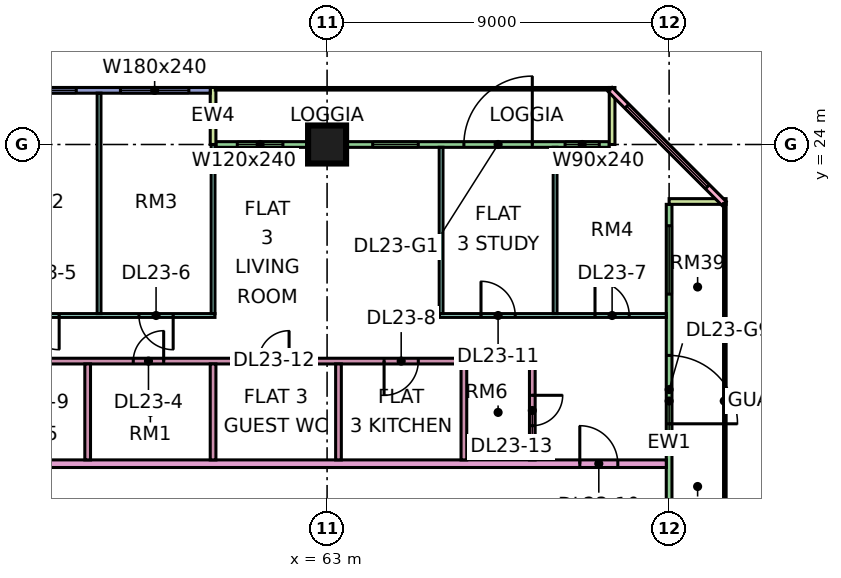
"""IFC4 building model, lengths in metres.
Left out: names, types, materials, properties, quantities, classifications, styles, units other than length and angle.
Written with IfcOpenShell. Run it as: python <this file> out.ifc"""

import sys

from ifc_helpers import new_model, si_unit, direction, frame, frame_2d, origin, origin_2d, place, context, subcontext, project, spatial, rectangle, extrude, element, fill, save


model = new_model("IFC4")
c1 = context("Model", 3, precision=1e-05, world=origin(), true_north=direction((0.0, 1.0)))
c2 = subcontext(c1, "Body", "Model", "MODEL_VIEW")
j1 = project(units=[si_unit("LENGTHUNIT", "METRE"), si_unit("PLANEANGLEUNIT", "RADIAN")], contexts=[c1])
p1 = place(None, origin())
s1 = spatial("IfcSite", under=j1, at=p1, CompositionType="ELEMENT")
p2 = place(p1, origin())
s2 = spatial("IfcBuilding", under=s1, at=p2, CompositionType="ELEMENT")
p3 = place(p2, frame((0.0, 0.0, 103.15)))
s3 = spatial("IfcBuildingStorey", under=s2, at=p3, CompositionType="ELEMENT", Elevation=103.15)
p4 = place(p3, frame((63.0, 24.0, 0.0), z_axis=(0.0, 0.0, 1.0), x_axis=(1.0, 0.0, 0.0)))
e1 = element("IfcColumn", 1, at=p4, inside=s3, PredefinedType="COLUMN", context=c2, shape_type="SweptSolid", body=[
    extrude(rectangle(XDim=1.0, YDim=1.0, at=origin_2d()), origin(), (0.0, 0.0, 1.0), 3.75),
])
p5 = place(p3, frame((70.425, 24.0, 0.0), z_axis=(0.0, 0.0, 1.0), x_axis=(-1.0, 0.0, 0.0)))
e2 = element("IfcWall", 2, at=p5, inside=s3, PredefinedType="SOLIDWALL", context=c2, shape_type="SweptSolid", body=[
    extrude(rectangle(XDim=10.35, YDim=0.15, at=frame_2d((5.175, 0.0))), origin(), (0.0, 0.0, 1.0), 3.35),
])
p6 = place(p5, frame((0.262, 0.0, 0.45)))
e3 = element("IfcOpeningElement", 3, at=p6, cuts=e2, PredefinedType="OPENING", context=c2, shape_type="SweptSolid", body=[
    extrude(rectangle(XDim=0.9, YDim=2.4, at=frame_2d((0.45, 1.2))), frame((0.0, 0.085, 0.0), z_axis=(0.0, -1.0, 0.0), x_axis=(1.0, 0.0, 0.0)), (0.0, 0.0, 1.0), 0.17),
])
p7 = place(p5, frame((2.025, 0.0, 0.0)))
e4 = element("IfcOpeningElement", 4, at=p7, cuts=e2, PredefinedType="OPENING", context=c2, shape_type="SweptSolid", body=[
    extrude(rectangle(XDim=1.8, YDim=2.4, at=frame_2d((0.9, 1.2))), frame((0.0, 0.085, 0.0), z_axis=(0.0, -1.0, 0.0), x_axis=(1.0, 0.0, 0.0)), (0.0, 0.0, 1.0), 0.17),
])
p8 = place(p5, frame((5.025, 0.0, 0.45)))
e5 = element("IfcOpeningElement", 5, at=p8, cuts=e2, PredefinedType="OPENING", context=c2, shape_type="SweptSolid", body=[
    extrude(rectangle(XDim=1.2, YDim=2.4, at=frame_2d((0.6, 1.2))), frame((0.0, 0.085, 0.0), z_axis=(0.0, -1.0, 0.0), x_axis=(1.0, 0.0, 0.0)), (0.0, 0.0, 1.0), 0.17),
])
p9 = place(p5, frame((8.587, 0.0, 0.45)))
e6 = element("IfcOpeningElement", 6, at=p9, cuts=e2, PredefinedType="OPENING", context=c2, shape_type="SweptSolid", body=[
    extrude(rectangle(XDim=1.2, YDim=2.4, at=frame_2d((0.6, 1.2))), frame((0.0, 0.085, 0.0), z_axis=(0.0, -1.0, 0.0), x_axis=(1.0, 0.0, 0.0)), (0.0, 0.0, 1.0), 0.17),
])
for number, where, z_axis, x_axis in (
    (7, (70.5, 25.5, 0.0), (0.0, 0.0, 1.0), (0.0, -1.0, 0.0)),
    (8, (60.0, 25.5, 0.0), (0.0, 0.0, 1.0), (0.0, -1.0, 0.0)),
):
    element("IfcWall", number, at=place(p3, frame(where, z_axis=z_axis, x_axis=x_axis)), inside=s3, PredefinedType="SOLIDWALL", context=c2, shape_type="SweptSolid", body=[
        extrude(rectangle(XDim=1.5, YDim=0.15, at=frame_2d((0.75, 0.0))), origin(), (0.0, 0.0, 1.0), 3.35),
    ])
p10 = place(p3, frame((59.925, 25.425, 0.0), z_axis=(0.0, 0.0, 1.0), x_axis=(-1.0, 0.0, 0.0)))
e9 = element("IfcWall", 9, at=p10, inside=s3, PredefinedType="SOLIDWALL", context=c2, shape_type="SweptSolid", body=[
    extrude(rectangle(XDim=11.85, YDim=0.15, at=frame_2d((5.925, 0.0))), origin(), (0.0, 0.0, 1.0), 3.35),
])
p11 = place(p10, frame((0.562, 0.0, 0.45)))
e10 = element("IfcOpeningElement", 10, at=p11, cuts=e9, PredefinedType="OPENING", context=c2, shape_type="SweptSolid", body=[
    extrude(rectangle(XDim=1.8, YDim=2.4, at=frame_2d((0.9, 1.2))), frame((0.0, 0.085, 0.0), z_axis=(0.0, -1.0, 0.0), x_axis=(1.0, 0.0, 0.0)), (0.0, 0.0, 1.0), 0.17),
])
p12 = place(p10, frame((3.525, 0.0, 0.45)))
e11 = element("IfcOpeningElement", 11, at=p12, cuts=e9, PredefinedType="OPENING", context=c2, shape_type="SweptSolid", body=[
    extrude(rectangle(XDim=1.8, YDim=2.4, at=frame_2d((0.9, 1.2))), frame((0.0, 0.085, 0.0), z_axis=(0.0, -1.0, 0.0), x_axis=(1.0, 0.0, 0.0)), (0.0, 0.0, 1.0), 0.17),
])
p13 = place(p10, frame((6.488, 0.0, 0.45)))
e12 = element("IfcOpeningElement", 12, at=p13, cuts=e9, PredefinedType="OPENING", context=c2, shape_type="SweptSolid", body=[
    extrude(rectangle(XDim=4.8, YDim=2.4, at=frame_2d((2.4, 1.2))), frame((0.0, 0.085, 0.0), z_axis=(0.0, -1.0, 0.0), x_axis=(1.0, 0.0, 0.0)), (0.0, 0.0, 1.0), 0.17),
])
p14 = place(p3, frame((72.0, 12.075, 0.0), z_axis=(0.0, 0.0, 1.0), x_axis=(0.0, 1.0, 0.0)))
e13 = element("IfcWall", 13, at=p14, inside=s3, PredefinedType="SOLIDWALL", context=c2, shape_type="SweptSolid", body=[
    extrude(rectangle(XDim=10.35, YDim=0.15, at=frame_2d((5.175, 0.0))), origin(), (0.0, 0.0, 1.0), 3.35),
])
p15 = place(p14, frame((4.575, 0.0, 0.0)))
e14 = element("IfcOpeningElement", 14, at=p15, cuts=e13, PredefinedType="OPENING", context=c2, shape_type="SweptSolid", body=[
    extrude(rectangle(XDim=1.8, YDim=2.4, at=frame_2d((0.9, 1.2))), frame((0.0, 0.085, 0.0), z_axis=(0.0, -1.0, 0.0), x_axis=(1.0, 0.0, 0.0)), (0.0, 0.0, 1.0), 0.17),
])
p16 = place(p14, frame((7.988, 0.0, 0.45)))
e15 = element("IfcOpeningElement", 15, at=p16, cuts=e13, PredefinedType="OPENING", context=c2, shape_type="SweptSolid", body=[
    extrude(rectangle(XDim=1.8, YDim=2.4, at=frame_2d((0.9, 1.2))), frame((0.0, 0.085, 0.0), z_axis=(0.0, -1.0, 0.0), x_axis=(1.0, 0.0, 0.0)), (0.0, 0.0, 1.0), 0.17),
])
p17 = place(p3, frame((73.5, 22.5, 0.0), z_axis=(0.0, 0.0, 1.0), x_axis=(-1.0, 0.0, 0.0)))
e16 = element("IfcWall", 16, at=p17, inside=s3, PredefinedType="SOLIDWALL", context=c2, shape_type="SweptSolid", body=[
    extrude(rectangle(XDim=1.5, YDim=0.15, at=frame_2d((0.75, 0.0))), origin(), (0.0, 0.0, 1.0), 3.35),
])
p18 = place(p3, frame((73.447, 22.447, 0.0), z_axis=(0.0, 0.0, 1.0), x_axis=(-0.707106781187, 0.707106781187, 0.0)))
e17 = element("IfcWall", 17, at=p18, inside=s3, PredefinedType="SOLIDWALL", context=c2, shape_type="SweptSolid", body=[
    extrude(rectangle(XDim=4.243, YDim=0.15, at=frame_2d((2.121, 0.0))), origin(), (0.0, 0.0, 1.0), 3.35),
])
p19 = place(p18, frame((0.621, 0.0, 0.45)))
e18 = element("IfcOpeningElement", 18, at=p19, cuts=e17, PredefinedType="OPENING", context=c2, shape_type="SweptSolid", body=[
    extrude(rectangle(XDim=3.0, YDim=2.4, at=frame_2d((1.5, 1.2))), frame((0.0, 0.085, 0.0), z_axis=(0.0, -1.0, 0.0), x_axis=(1.0, 0.0, 0.0)), (0.0, 0.0, 1.0), 0.17),
])
p20 = place(p3, frame((51.225, 15.6, 0.0), z_axis=(0.0, 0.0, 1.0), x_axis=(1.0, 0.0, 0.0)))
e19 = element("IfcWall", 19, at=p20, inside=s3, PredefinedType="PARTITIONING", context=c2, shape_type="SweptSolid", body=[
    extrude(rectangle(XDim=20.701, YDim=0.2, at=frame_2d((10.351, 0.0))), origin(), (0.0, 0.0, 1.0), 3.35),
])
p21 = place(p20, frame((18.425, 0.0, 0.0)))
e20 = element("IfcOpeningElement", 20, at=p21, cuts=e19, PredefinedType="OPENING", context=c2, shape_type="SweptSolid", body=[
    extrude(rectangle(XDim=1.0, YDim=2.1, at=frame_2d((0.5, 1.05))), frame((0.0, 0.11, 0.0), z_axis=(0.0, -1.0, 0.0), x_axis=(1.0, 0.0, 0.0)), (0.0, 0.0, 1.0), 0.22),
])
p22 = place(p20, frame((0.875, 0.0, 0.0)))
e21 = element("IfcOpeningElement", 21, at=p22, cuts=e19, PredefinedType="OPENING", context=c2, shape_type="SweptSolid", body=[
    extrude(rectangle(XDim=1.0, YDim=2.1, at=frame_2d((0.5, 1.05))), frame((0.0, 0.11, 0.0), z_axis=(0.0, -1.0, 0.0), x_axis=(1.0, 0.0, 0.0)), (0.0, 0.0, 1.0), 0.22),
])
p23 = place(p3, frame((54.1, 18.3, 0.0), z_axis=(0.0, 0.0, 1.0), x_axis=(1.0, 0.0, 0.0)))
e22 = element("IfcWall", 22, at=p23, inside=s3, PredefinedType="PARTITIONING", context=c2, shape_type="SweptSolid", body=[
    extrude(rectangle(XDim=14.375, YDim=0.15, at=frame_2d((7.188, 0.0))), origin(), (0.0, 0.0, 1.0), 3.35),
])
p24 = place(p23, frame((3.8, 0.0, 0.0)))
e23 = element("IfcOpeningElement", 23, at=p24, cuts=e22, PredefinedType="OPENING", context=c2, shape_type="SweptSolid", body=[
    extrude(rectangle(XDim=0.8, YDim=2.1, at=frame_2d((0.4, 1.05))), frame((0.0, 0.085, 0.0), z_axis=(0.0, -1.0, 0.0), x_axis=(1.0, 0.0, 0.0)), (0.0, 0.0, 1.0), 0.17),
])
p25 = place(p23, frame((10.4, 0.0, 0.0)))
e24 = element("IfcOpeningElement", 24, at=p25, cuts=e22, PredefinedType="OPENING", context=c2, shape_type="SweptSolid", body=[
    extrude(rectangle(XDim=0.9, YDim=2.1, at=frame_2d((0.45, 1.05))), frame((0.0, 0.085, 0.0), z_axis=(0.0, -1.0, 0.0), x_axis=(1.0, 0.0, 0.0)), (0.0, 0.0, 1.0), 0.17),
])
p26 = place(p23, frame((0.8, 0.0, 0.0)))
e25 = element("IfcOpeningElement", 25, at=p26, cuts=e22, PredefinedType="OPENING", context=c2, shape_type="SweptSolid", body=[
    extrude(rectangle(XDim=0.8, YDim=2.1, at=frame_2d((0.4, 1.05))), frame((0.0, 0.085, 0.0), z_axis=(0.0, -1.0, 0.0), x_axis=(1.0, 0.0, 0.0)), (0.0, 0.0, 1.0), 0.17),
])
p27 = place(p23, frame((7.1, 0.0, 0.0)))
e26 = element("IfcOpeningElement", 26, at=p27, cuts=e22, PredefinedType="OPENING", context=c2, shape_type="SweptSolid", body=[
    extrude(rectangle(XDim=0.8, YDim=2.1, at=frame_2d((0.4, 1.05))), frame((0.0, 0.085, 0.0), z_axis=(0.0, -1.0, 0.0), x_axis=(1.0, 0.0, 0.0)), (0.0, 0.0, 1.0), 0.17),
])
p28 = place(p3, frame((54.1, 19.5, 0.0), z_axis=(0.0, 0.0, 1.0), x_axis=(1.0, 0.0, 0.0)))
e27 = element("IfcWall", 27, at=p28, inside=s3, PredefinedType="PARTITIONING", context=c2, shape_type="SweptSolid", body=[
    extrude(rectangle(XDim=5.95, YDim=0.1, at=frame_2d((2.975, 0.0))), origin(), (0.0, 0.0, 1.0), 3.35),
])
p29 = place(p28, frame((0.95, 0.0, 0.0)))
e28 = element("IfcOpeningElement", 28, at=p29, cuts=e27, PredefinedType="OPENING", context=c2, shape_type="SweptSolid", body=[
    extrude(rectangle(XDim=0.9, YDim=2.1, at=frame_2d((0.45, 1.05))), frame((0.0, 0.06, 0.0), z_axis=(0.0, -1.0, 0.0), x_axis=(1.0, 0.0, 0.0)), (0.0, 0.0, 1.0), 0.12),
])
p30 = place(p28, frame((3.95, 0.0, 0.0)))
e29 = element("IfcOpeningElement", 29, at=p30, cuts=e27, PredefinedType="OPENING", context=c2, shape_type="SweptSolid", body=[
    extrude(rectangle(XDim=0.9, YDim=2.1, at=frame_2d((0.45, 1.05))), frame((0.0, 0.06, 0.0), z_axis=(0.0, -1.0, 0.0), x_axis=(1.0, 0.0, 0.0)), (0.0, 0.0, 1.0), 0.12),
])
p31 = place(p3, frame((56.7, 15.7, 0.0), z_axis=(0.0, 0.0, 1.0), x_axis=(0.0, 1.0, 0.0)))
e30 = element("IfcWall", 30, at=p31, inside=s3, PredefinedType="PARTITIONING", context=c2, shape_type="SweptSolid", body=[
    extrude(rectangle(XDim=2.525, YDim=0.15, at=frame_2d((1.263, 0.0))), origin(), (0.0, 0.0, 1.0), 3.35),
])
p32 = place(p3, frame((57.0, 19.55, 0.0), z_axis=(0.0, 0.0, 1.0), x_axis=(0.0, 1.0, 0.0)))
e31 = element("IfcWall", 31, at=p32, inside=s3, PredefinedType="PARTITIONING", context=c2, shape_type="SweptSolid", body=[
    extrude(rectangle(XDim=5.801, YDim=0.1, at=frame_2d((2.9, 0.0))), origin(), (0.0, 0.0, 1.0), 3.35),
])
p33 = place(p3, frame((60.0, 15.7, 0.0), z_axis=(0.0, 0.0, 1.0), x_axis=(0.0, 1.0, 0.0)))
e32 = element("IfcWall", 32, at=p33, inside=s3, PredefinedType="PARTITIONING", context=c2, shape_type="SweptSolid", body=[
    extrude(rectangle(XDim=2.525, YDim=0.15, at=frame_2d((1.263, 0.0))), origin(), (0.0, 0.0, 1.0), 3.35),
])
p34 = place(p3, frame((60.0, 19.55, 0.0), z_axis=(0.0, 0.0, 1.0), x_axis=(0.0, 1.0, 0.0)))
e33 = element("IfcWall", 33, at=p34, inside=s3, PredefinedType="PARTITIONING", context=c2, shape_type="SweptSolid", body=[
    extrude(rectangle(XDim=4.45, YDim=0.1, at=frame_2d((2.225, 0.0))), origin(), (0.0, 0.0, 1.0), 3.35),
])
p35 = place(p3, frame((63.3, 15.7, 0.0), z_axis=(0.0, 0.0, 1.0), x_axis=(0.0, 1.0, 0.0)))
e34 = element("IfcWall", 34, at=p35, inside=s3, PredefinedType="PARTITIONING", context=c2, shape_type="SweptSolid", body=[
    extrude(rectangle(XDim=2.525, YDim=0.15, at=frame_2d((1.263, 0.0))), origin(), (0.0, 0.0, 1.0), 3.35),
])
p36 = place(p3, frame((65.95, 19.5, 0.0), z_axis=(0.0, 0.0, 1.0), x_axis=(1.0, 0.0, 0.0)))
e35 = element("IfcWall", 35, at=p36, inside=s3, PredefinedType="PARTITIONING", context=c2, shape_type="SweptSolid", body=[
    extrude(rectangle(XDim=5.976, YDim=0.1, at=frame_2d((2.988, 0.0))), origin(), (0.0, 0.0, 1.0), 3.35),
])
p37 = place(p36, frame((4.1, 0.0, 0.0)))
e36 = element("IfcOpeningElement", 36, at=p37, cuts=e35, PredefinedType="OPENING", context=c2, shape_type="SweptSolid", body=[
    extrude(rectangle(XDim=0.9, YDim=2.1, at=frame_2d((0.45, 1.05))), frame((0.0, 0.06, 0.0), z_axis=(0.0, -1.0, 0.0), x_axis=(1.0, 0.0, 0.0)), (0.0, 0.0, 1.0), 0.12),
])
p38 = place(p36, frame((1.1, 0.0, 0.0)))
e37 = element("IfcOpeningElement", 37, at=p38, cuts=e35, PredefinedType="OPENING", context=c2, shape_type="SweptSolid", body=[
    extrude(rectangle(XDim=0.9, YDim=2.1, at=frame_2d((0.45, 1.05))), frame((0.0, 0.06, 0.0), z_axis=(0.0, -1.0, 0.0), x_axis=(1.0, 0.0, 0.0)), (0.0, 0.0, 1.0), 0.12),
])
p39 = place(p3, frame((66.0, 19.55, 0.0), z_axis=(0.0, 0.0, 1.0), x_axis=(0.0, 1.0, 0.0)))
e38 = element("IfcWall", 38, at=p39, inside=s3, PredefinedType="PARTITIONING", context=c2, shape_type="SweptSolid", body=[
    extrude(rectangle(XDim=4.376, YDim=0.1, at=frame_2d((2.188, 0.0))), origin(), (0.0, 0.0, 1.0), 3.35),
])
p40 = place(p3, frame((66.6, 15.7, 0.0), z_axis=(0.0, 0.0, 1.0), x_axis=(0.0, 1.0, 0.0)))
e39 = element("IfcWall", 39, at=p40, inside=s3, PredefinedType="PARTITIONING", context=c2, shape_type="SweptSolid", body=[
    extrude(rectangle(XDim=2.525, YDim=0.15, at=frame_2d((1.263, 0.0))), origin(), (0.0, 0.0, 1.0), 3.35),
])
p41 = place(p3, frame((68.4, 15.7, 0.0), z_axis=(0.0, 0.0, 1.0), x_axis=(0.0, 1.0, 0.0)))
e40 = element("IfcWall", 40, at=p41, inside=s3, PredefinedType="PARTITIONING", context=c2, shape_type="SweptSolid", body=[
    extrude(rectangle(XDim=2.525, YDim=0.15, at=frame_2d((1.263, 0.0))), origin(), (0.0, 0.0, 1.0), 3.35),
])
p42 = place(p41, frame((0.9, 0.0, 0.0)))
e41 = element("IfcOpeningElement", 41, at=p42, cuts=e40, PredefinedType="OPENING", context=c2, shape_type="SweptSolid", body=[
    extrude(rectangle(XDim=0.8, YDim=2.1, at=frame_2d((0.4, 1.05))), frame((0.0, 0.085, 0.0), z_axis=(0.0, -1.0, 0.0), x_axis=(1.0, 0.0, 0.0)), (0.0, 0.0, 1.0), 0.17),
])
p43 = place(p3, frame((69.0, 19.55, 0.0), z_axis=(0.0, 0.0, 1.0), x_axis=(0.0, 1.0, 0.0)))
e42 = element("IfcWall", 42, at=p43, inside=s3, PredefinedType="PARTITIONING", context=c2, shape_type="SweptSolid", body=[
    extrude(rectangle(XDim=4.376, YDim=0.1, at=frame_2d((2.188, 0.0))), origin(), (0.0, 0.0, 1.0), 3.35),
])
p44 = place(p6, origin())
e43 = element("IfcWindow", 43, at=p44, inside=s3, PartitioningType="SINGLE_PANEL", PredefinedType="WINDOW", context=c2, shape_type="SweptSolid", body=[
    extrude(rectangle(XDim=0.9, YDim=2.4, at=frame_2d((0.45, 1.2))), frame((0.0, 0.03, 0.0), z_axis=(0.0, -1.0, 0.0), x_axis=(1.0, 0.0, 0.0)), (0.0, 0.0, 1.0), 0.06),
])
fill(e3, e43)
p45 = place(p7, frame((1.8, 0.0, 0.0), z_axis=(0.0, 0.0, 1.0), x_axis=(-1.0, 0.0, 0.0)))
e44 = element("IfcDoor", 44, at=p45, inside=s3, OperationType="DOUBLE_DOOR_SINGLE_SWING", PredefinedType="DOOR", context=c2, shape_type="SweptSolid", body=[
    extrude(rectangle(XDim=1.8, YDim=2.4, at=frame_2d((0.9, 1.2))), frame((0.0, 0.025, 0.0), z_axis=(0.0, -1.0, 0.0), x_axis=(1.0, 0.0, 0.0)), (0.0, 0.0, 1.0), 0.05),
])
fill(e4, e44)
p46 = place(p8, origin())
e45 = element("IfcWindow", 45, at=p46, inside=s3, PartitioningType="SINGLE_PANEL", PredefinedType="WINDOW", context=c2, shape_type="SweptSolid", body=[
    extrude(rectangle(XDim=1.2, YDim=2.4, at=frame_2d((0.6, 1.2))), frame((0.0, 0.03, 0.0), z_axis=(0.0, -1.0, 0.0), x_axis=(1.0, 0.0, 0.0)), (0.0, 0.0, 1.0), 0.06),
])
fill(e5, e45)
p47 = place(p9, origin())
e46 = element("IfcWindow", 46, at=p47, inside=s3, PartitioningType="SINGLE_PANEL", PredefinedType="WINDOW", context=c2, shape_type="SweptSolid", body=[
    extrude(rectangle(XDim=1.2, YDim=2.4, at=frame_2d((0.6, 1.2))), frame((0.0, 0.03, 0.0), z_axis=(0.0, -1.0, 0.0), x_axis=(1.0, 0.0, 0.0)), (0.0, 0.0, 1.0), 0.06),
])
fill(e6, e46)
p48 = place(p11, origin())
e47 = element("IfcWindow", 47, at=p48, inside=s3, PartitioningType="SINGLE_PANEL", PredefinedType="WINDOW", context=c2, shape_type="SweptSolid", body=[
    extrude(rectangle(XDim=1.8, YDim=2.4, at=frame_2d((0.9, 1.2))), frame((0.0, 0.03, 0.0), z_axis=(0.0, -1.0, 0.0), x_axis=(1.0, 0.0, 0.0)), (0.0, 0.0, 1.0), 0.06),
])
fill(e10, e47)
p49 = place(p12, origin())
e48 = element("IfcWindow", 48, at=p49, inside=s3, PartitioningType="SINGLE_PANEL", PredefinedType="WINDOW", context=c2, shape_type="SweptSolid", body=[
    extrude(rectangle(XDim=1.8, YDim=2.4, at=frame_2d((0.9, 1.2))), frame((0.0, 0.03, 0.0), z_axis=(0.0, -1.0, 0.0), x_axis=(1.0, 0.0, 0.0)), (0.0, 0.0, 1.0), 0.06),
])
fill(e11, e48)
p50 = place(p15, frame((1.8, 0.0, 0.0), z_axis=(0.0, 0.0, 1.0), x_axis=(-1.0, 0.0, 0.0)))
e49 = element("IfcDoor", 49, at=p50, inside=s3, OperationType="DOUBLE_DOOR_SINGLE_SWING", PredefinedType="DOOR", context=c2, shape_type="SweptSolid", body=[
    extrude(rectangle(XDim=1.8, YDim=2.4, at=frame_2d((0.9, 1.2))), frame((0.0, 0.025, 0.0), z_axis=(0.0, -1.0, 0.0), x_axis=(1.0, 0.0, 0.0)), (0.0, 0.0, 1.0), 0.05),
])
fill(e14, e49)
p51 = place(p16, origin())
e50 = element("IfcWindow", 50, at=p51, inside=s3, PartitioningType="SINGLE_PANEL", PredefinedType="WINDOW", context=c2, shape_type="SweptSolid", body=[
    extrude(rectangle(XDim=1.8, YDim=2.4, at=frame_2d((0.9, 1.2))), frame((0.0, 0.03, 0.0), z_axis=(0.0, -1.0, 0.0), x_axis=(1.0, 0.0, 0.0)), (0.0, 0.0, 1.0), 0.06),
])
fill(e15, e50)
p52 = place(p19, origin())
e51 = element("IfcWindow", 51, at=p52, inside=s3, PartitioningType="SINGLE_PANEL", PredefinedType="WINDOW", context=c2, shape_type="SweptSolid", body=[
    extrude(rectangle(XDim=3.0, YDim=2.4, at=frame_2d((1.5, 1.2))), frame((0.0, 0.03, 0.0), z_axis=(0.0, -1.0, 0.0), x_axis=(1.0, 0.0, 0.0)), (0.0, 0.0, 1.0), 0.06),
])
fill(e18, e51)
p53 = place(p24, frame((0.8, 0.0, 0.0), z_axis=(0.0, 0.0, 1.0), x_axis=(-1.0, 0.0, 0.0)))
e52 = element("IfcDoor", 52, at=p53, inside=s3, OperationType="SINGLE_SWING_RIGHT", PredefinedType="DOOR", context=c2, shape_type="SweptSolid", body=[
    extrude(rectangle(XDim=0.8, YDim=2.1, at=frame_2d((0.4, 1.05))), frame((0.0, 0.025, 0.0), z_axis=(0.0, -1.0, 0.0), x_axis=(1.0, 0.0, 0.0)), (0.0, 0.0, 1.0), 0.05),
])
fill(e23, e52)
p54 = place(p29, origin())
e53 = element("IfcDoor", 53, at=p54, inside=s3, OperationType="SINGLE_SWING_RIGHT", PredefinedType="DOOR", context=c2, shape_type="SweptSolid", body=[
    extrude(rectangle(XDim=0.9, YDim=2.1, at=frame_2d((0.45, 1.05))), frame((0.0, 0.025, 0.0), z_axis=(0.0, -1.0, 0.0), x_axis=(1.0, 0.0, 0.0)), (0.0, 0.0, 1.0), 0.05),
])
fill(e28, e53)
p55 = place(p30, origin())
e54 = element("IfcDoor", 54, at=p55, inside=s3, OperationType="SINGLE_SWING_RIGHT", PredefinedType="DOOR", context=c2, shape_type="SweptSolid", body=[
    extrude(rectangle(XDim=0.9, YDim=2.1, at=frame_2d((0.45, 1.05))), frame((0.0, 0.025, 0.0), z_axis=(0.0, -1.0, 0.0), x_axis=(1.0, 0.0, 0.0)), (0.0, 0.0, 1.0), 0.05),
])
fill(e29, e54)
p56 = place(p37, origin())
e55 = element("IfcDoor", 55, at=p56, inside=s3, OperationType="SINGLE_SWING_LEFT", PredefinedType="DOOR", context=c2, shape_type="SweptSolid", body=[
    extrude(rectangle(XDim=0.9, YDim=2.1, at=frame_2d((0.45, 1.05))), frame((0.0, 0.025, 0.0), z_axis=(0.0, -1.0, 0.0), x_axis=(1.0, 0.0, 0.0)), (0.0, 0.0, 1.0), 0.05),
])
fill(e36, e55)
p57 = place(p25, frame((0.9, 0.0, 0.0), z_axis=(0.0, 0.0, 1.0), x_axis=(-1.0, 0.0, 0.0)))
e56 = element("IfcDoor", 56, at=p57, inside=s3, OperationType="SINGLE_SWING_LEFT", PredefinedType="DOOR", context=c2, shape_type="SweptSolid", body=[
    extrude(rectangle(XDim=0.9, YDim=2.1, at=frame_2d((0.45, 1.05))), frame((0.0, 0.025, 0.0), z_axis=(0.0, -1.0, 0.0), x_axis=(1.0, 0.0, 0.0)), (0.0, 0.0, 1.0), 0.05),
])
fill(e24, e56)
p58 = place(p21, origin())
e57 = element("IfcDoor", 57, at=p58, inside=s3, OperationType="SINGLE_SWING_LEFT", PredefinedType="DOOR", context=c2, shape_type="SweptSolid", body=[
    extrude(rectangle(XDim=1.0, YDim=2.1, at=frame_2d((0.5, 1.05))), frame((0.0, 0.025, 0.0), z_axis=(0.0, -1.0, 0.0), x_axis=(1.0, 0.0, 0.0)), (0.0, 0.0, 1.0), 0.05),
])
fill(e20, e57)
p59 = place(p38, origin())
e58 = element("IfcDoor", 58, at=p59, inside=s3, OperationType="SINGLE_SWING_LEFT", PredefinedType="DOOR", context=c2, shape_type="SweptSolid", body=[
    extrude(rectangle(XDim=0.9, YDim=2.1, at=frame_2d((0.45, 1.05))), frame((0.0, 0.025, 0.0), z_axis=(0.0, -1.0, 0.0), x_axis=(1.0, 0.0, 0.0)), (0.0, 0.0, 1.0), 0.05),
])
fill(e37, e58)
p60 = place(p27, frame((0.8, 0.0, 0.0), z_axis=(0.0, 0.0, 1.0), x_axis=(-1.0, 0.0, 0.0)))
e59 = element("IfcDoor", 59, at=p60, inside=s3, OperationType="SINGLE_SWING_RIGHT", PredefinedType="DOOR", context=c2, shape_type="SweptSolid", body=[
    extrude(rectangle(XDim=0.8, YDim=2.1, at=frame_2d((0.4, 1.05))), frame((0.0, 0.025, 0.0), z_axis=(0.0, -1.0, 0.0), x_axis=(1.0, 0.0, 0.0)), (0.0, 0.0, 1.0), 0.05),
])
fill(e26, e59)
p61 = place(p42, origin())
e60 = element("IfcDoor", 60, at=p61, inside=s3, OperationType="SINGLE_SWING_RIGHT", PredefinedType="DOOR", context=c2, shape_type="SweptSolid", body=[
    extrude(rectangle(XDim=0.8, YDim=2.1, at=frame_2d((0.4, 1.05))), frame((0.0, 0.025, 0.0), z_axis=(0.0, -1.0, 0.0), x_axis=(1.0, 0.0, 0.0)), (0.0, 0.0, 1.0), 0.05),
])
fill(e41, e60)
save(model, sys.argv[1])
